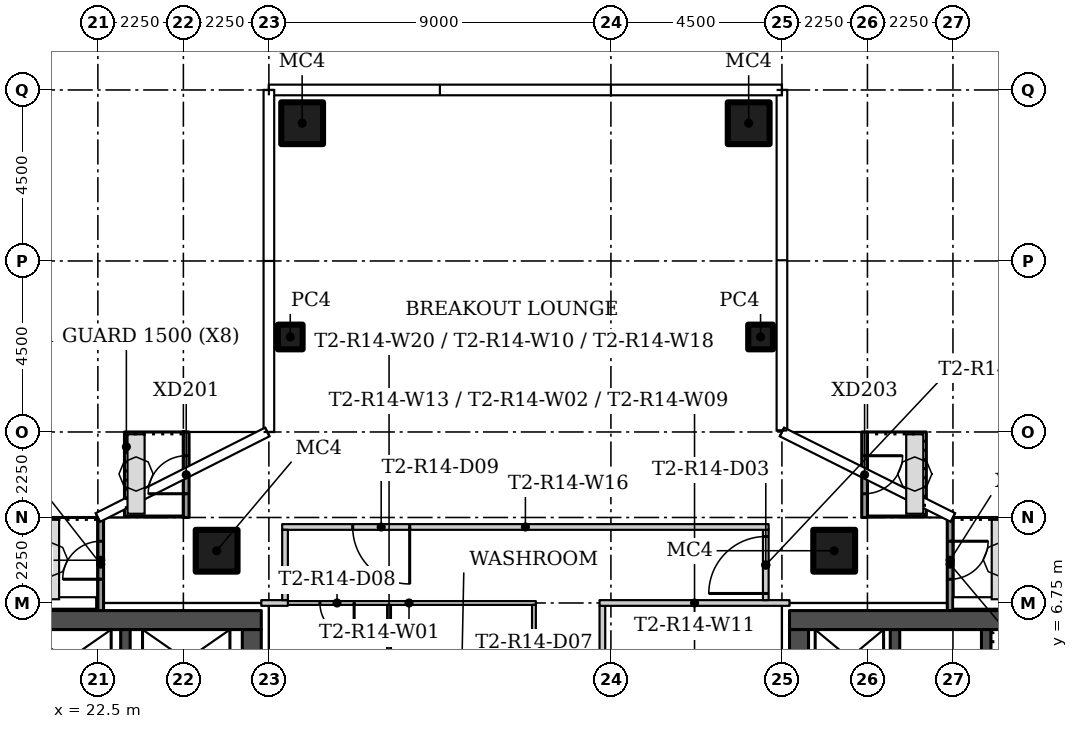
"""IFC4 building model, lengths in metres.
Left out: names, types, materials, properties, quantities, classifications, styles, units other than length and angle.
Written with IfcOpenShell. Run it as: python <this file> out.ifc"""

import sys

from ifc_helpers import new_model, si_unit, direction, frame, frame_2d, origin, origin_2d, place, context, subcontext, project, spatial, rectangle, hollow_rectangle, extrude, element, fill, save


model = new_model("IFC4")
c1 = context("Model", 3, precision=1e-05, world=origin(), true_north=direction((0.0, 1.0)))
c2 = subcontext(c1, "Body", "Model", "MODEL_VIEW")
j1 = project(units=[si_unit("LENGTHUNIT", "METRE"), si_unit("PLANEANGLEUNIT", "RADIAN")], contexts=[c1])
p1 = place(None, origin())
s1 = spatial("IfcSite", under=j1, at=p1, CompositionType="ELEMENT")
p2 = place(p1, origin())
s2 = spatial("IfcBuilding", under=s1, at=p2, CompositionType="ELEMENT")
p3 = place(p2, frame((0.0, 0.0, 138.9)))
s3 = spatial("IfcBuildingStorey", under=s2, at=p3, CompositionType="ELEMENT", Elevation=138.9)
for number, where in (
    (1, (25.625, 8.125, 0.0)),
    (2, (41.875, 8.125, 0.0)),
):
    element("IfcColumn", number, at=place(p3, frame(where)), inside=s3, PredefinedType="COLUMN", context=c2, shape_type="SweptSolid", body=[
        extrude(hollow_rectangle(XDim=1.1, YDim=1.1, WallThickness=0.04, at=origin_2d()), origin(), (0.0, 0.0, 1.0), 3.55),
    ])
p4 = place(p3, frame((39.938, 13.75, 0.0)))
e3 = element("IfcColumn", 3, at=p4, inside=s3, PredefinedType="COLUMN", context=c2, shape_type="SweptSolid", body=[
    extrude(hollow_rectangle(XDim=0.65, YDim=0.65, WallThickness=0.02, at=origin_2d()), origin(), (0.0, 0.0, 1.0), 3.55),
])
p5 = place(p3, frame((39.625, 19.375, 0.0)))
e4 = element("IfcColumn", 4, at=p5, inside=s3, PredefinedType="COLUMN", context=c2, shape_type="SweptSolid", body=[
    extrude(hollow_rectangle(XDim=1.1, YDim=1.1, WallThickness=0.04, at=origin_2d()), origin(), (0.0, 0.0, 1.0), 3.55),
])
p6 = place(p3, frame((27.562, 13.75, 0.0)))
e5 = element("IfcColumn", 5, at=p6, inside=s3, PredefinedType="COLUMN", context=c2, shape_type="SweptSolid", body=[
    extrude(hollow_rectangle(XDim=0.65, YDim=0.65, WallThickness=0.02, at=origin_2d()), origin(), (0.0, 0.0, 1.0), 3.55),
])
p7 = place(p3, frame((27.875, 19.375, 0.0)))
e6 = element("IfcColumn", 6, at=p7, inside=s3, PredefinedType="COLUMN", context=c2, shape_type="SweptSolid", body=[
    extrude(hollow_rectangle(XDim=1.1, YDim=1.1, WallThickness=0.04, at=origin_2d()), origin(), (0.0, 0.0, 1.0), 3.55),
])
p8 = place(p3, frame((34.025, 6.75, 0.0), z_axis=(0.0, 0.0, 1.0), x_axis=(-1.0, 0.0, 0.0)))
e7 = element("IfcWall", 7, at=p8, inside=s3, PredefinedType="PARTITIONING", context=c2, shape_type="SweptSolid", body=[
    extrude(rectangle(XDim=6.675, YDim=0.1, at=frame_2d((3.337, 0.0))), origin(), (0.0, 0.0, 1.0), 3.55),
])
p9 = place(p8, frame((4.781, 0.0, 0.0)))
e8 = element("IfcOpeningElement", 8, at=p9, cuts=e7, PredefinedType="OPENING", context=c2, shape_type="SweptSolid", body=[
    extrude(rectangle(XDim=0.9, YDim=2.1, at=frame_2d((0.45, 1.05))), frame((0.0, 0.06, 0.0), z_axis=(0.0, -1.0, 0.0), x_axis=(1.0, 0.0, 0.0)), (0.0, 0.0, 1.0), 0.12),
])
p10 = place(p3, frame((33.975, 2.5, 0.0), z_axis=(0.0, 0.0, 1.0), x_axis=(0.0, 1.0, 0.0)))
e9 = element("IfcWall", 9, at=p10, inside=s3, PredefinedType="PARTITIONING", context=c2, shape_type="SweptSolid", body=[
    extrude(rectangle(XDim=4.2, YDim=0.1, at=frame_2d((2.1, 0.0))), origin(), (0.0, 0.0, 1.0), 3.55),
])
p11 = place(p10, frame((1.65, 0.0, 0.0)))
e10 = element("IfcOpeningElement", 10, at=p11, cuts=e9, PredefinedType="OPENING", context=c2, shape_type="SweptSolid", body=[
    extrude(rectangle(XDim=0.9, YDim=2.1, at=frame_2d((0.45, 1.05))), frame((0.0, 0.06, 0.0), z_axis=(0.0, -1.0, 0.0), x_axis=(1.0, 0.0, 0.0)), (0.0, 0.0, 1.0), 0.12),
])
p12 = place(p3, frame((35.775, 6.675, 0.0), z_axis=(0.0, 0.0, 1.0), x_axis=(0.0, -1.0, 0.0)))
e11 = element("IfcWall", 11, at=p12, inside=s3, PredefinedType="PARTITIONING", context=c2, shape_type="SweptSolid", body=[
    extrude(rectangle(XDim=4.15, YDim=0.15, at=frame_2d((2.075, 0.0))), origin(), (0.0, 0.0, 1.0), 3.55),
])
p13 = place(p12, frame((1.625, 0.0, 0.0)))
e12 = element("IfcOpeningElement", 12, at=p13, cuts=e11, PredefinedType="OPENING", context=c2, shape_type="SweptSolid", body=[
    extrude(rectangle(XDim=0.9, YDim=2.1, at=frame_2d((0.45, 1.05))), frame((0.0, 0.085, 0.0), z_axis=(0.0, -1.0, 0.0), x_axis=(1.0, 0.0, 0.0)), (0.0, 0.0, 1.0), 0.17),
])
p14 = place(p3, frame((27.5, 6.75, 0.0), z_axis=(0.0, 0.0, 1.0), x_axis=(-1.0, 0.0, 0.0)))
e13 = element("IfcWall", 13, at=p14, inside=s3, PredefinedType="PARTITIONING", context=c2, shape_type="SweptSolid", body=[
    extrude(rectangle(XDim=0.7, YDim=0.15, at=frame_2d((0.35, 0.0))), origin(), (0.0, 0.0, 1.0), 3.55),
])
p15 = place(p3, frame((40.7, 6.75, 0.0), z_axis=(0.0, 0.0, 1.0), x_axis=(-1.0, 0.0, 0.0)))
e14 = element("IfcWall", 14, at=p15, inside=s3, PredefinedType="PARTITIONING", context=c2, shape_type="SweptSolid", body=[
    extrude(rectangle(XDim=5.0, YDim=0.15, at=frame_2d((2.5, 0.0))), origin(), (0.0, 0.0, 1.0), 3.55),
])
p16 = place(p3, frame((40.075, 6.825, 0.0), z_axis=(0.0, 0.0, 1.0), x_axis=(0.0, 1.0, 0.0)))
e15 = element("IfcWall", 15, at=p16, inside=s3, PredefinedType="PARTITIONING", context=c2, shape_type="SweptSolid", body=[
    extrude(rectangle(XDim=1.85, YDim=0.15, at=frame_2d((0.925, 0.0))), origin(), (0.0, 0.0, 1.0), 3.55),
])
p17 = place(p16, frame((0.175, 0.0, 0.0)))
e16 = element("IfcOpeningElement", 16, at=p17, cuts=e15, PredefinedType="OPENING", context=c2, shape_type="SweptSolid", body=[
    extrude(rectangle(XDim=1.5, YDim=2.1, at=frame_2d((0.75, 1.05))), frame((0.0, 0.085, 0.0), z_axis=(0.0, -1.0, 0.0), x_axis=(1.0, 0.0, 0.0)), (0.0, 0.0, 1.0), 0.17),
])
p18 = place(p3, frame((40.15, 8.75, 0.0), z_axis=(0.0, 0.0, 1.0), x_axis=(-1.0, 0.0, 0.0)))
e17 = element("IfcWall", 17, at=p18, inside=s3, PredefinedType="PARTITIONING", context=c2, shape_type="SweptSolid", body=[
    extrude(rectangle(XDim=12.8, YDim=0.15, at=frame_2d((6.4, 0.0))), origin(), (0.0, 0.0, 1.0), 3.55),
])
p19 = place(p18, frame((9.445, 0.0, 0.0)))
e18 = element("IfcOpeningElement", 18, at=p19, cuts=e17, PredefinedType="OPENING", context=c2, shape_type="SweptSolid", body=[
    extrude(rectangle(XDim=1.5, YDim=2.1, at=frame_2d((0.75, 1.05))), frame((0.0, 0.085, 0.0), z_axis=(0.0, -1.0, 0.0), x_axis=(1.0, 0.0, 0.0)), (0.0, 0.0, 1.0), 0.17),
])
p20 = place(p3, frame((27.425, 8.675, 0.0), z_axis=(0.0, 0.0, 1.0), x_axis=(0.0, -1.0, 0.0)))
e19 = element("IfcWall", 19, at=p20, inside=s3, PredefinedType="PARTITIONING", context=c2, shape_type="SweptSolid", body=[
    extrude(rectangle(XDim=1.85, YDim=0.15, at=frame_2d((0.925, 0.0))), origin(), (0.0, 0.0, 1.0), 3.55),
])
p21 = place(p3, frame((30.162, 6.7, 0.0), z_axis=(0.0, 0.0, 1.0), x_axis=(0.0, -1.0, 0.0)))
e20 = element("IfcWall", 20, at=p21, inside=s3, PredefinedType="PARTITIONING", context=c2, shape_type="SweptSolid", body=[
    extrude(rectangle(XDim=4.2, YDim=0.1, at=frame_2d((2.1, 0.0))), origin(), (0.0, 0.0, 1.0), 3.55),
])
p22 = place(p3, frame((24.825, 9.0, 0.0), z_axis=(0.0, 0.0, 1.0), x_axis=(0.0, 1.0, 0.0)))
e21 = element("IfcWall", 21, at=p22, inside=s3, PredefinedType="SOLIDWALL", context=c2, shape_type="SweptSolid", body=[
    extrude(rectangle(XDim=2.25, YDim=0.15, at=frame_2d((1.125, 0.0))), origin(), (0.0, 0.0, 1.0), 3.45),
])
p23 = place(p22, frame((0.625, 0.0, 0.0)))
e22 = element("IfcOpeningElement", 22, at=p23, cuts=e21, PredefinedType="OPENING", context=c2, shape_type="SweptSolid", body=[
    extrude(rectangle(XDim=1.0, YDim=2.4, at=frame_2d((0.5, 1.2))), frame((0.0, 0.085, 0.0), z_axis=(0.0, -1.0, 0.0), x_axis=(1.0, 0.0, 0.0)), (0.0, 0.0, 1.0), 0.17),
])
p24 = place(p3, frame((22.575, 6.543, 0.0), z_axis=(0.0, 0.0, 1.0), x_axis=(0.0, 1.0, 0.0)))
e23 = element("IfcWall", 23, at=p24, inside=s3, PredefinedType="SOLIDWALL", context=c2, shape_type="SweptSolid", body=[
    extrude(rectangle(XDim=2.457, YDim=0.15, at=frame_2d((1.229, 0.0))), origin(), (0.0, 0.0, 1.0), 3.45),
])
p25 = place(p24, frame((0.832, 0.0, 0.0)))
e24 = element("IfcOpeningElement", 24, at=p25, cuts=e23, PredefinedType="OPENING", context=c2, shape_type="SweptSolid", body=[
    extrude(rectangle(XDim=1.0, YDim=2.4, at=frame_2d((0.5, 1.2))), frame((0.0, 0.085, 0.0), z_axis=(0.0, -1.0, 0.0), x_axis=(1.0, 0.0, 0.0)), (0.0, 0.0, 1.0), 0.17),
])
p26 = place(p3, frame((42.675, 11.25, 0.0), z_axis=(0.0, 0.0, 1.0), x_axis=(0.0, -1.0, 0.0)))
e25 = element("IfcWall", 25, at=p26, inside=s3, PredefinedType="SOLIDWALL", context=c2, shape_type="SweptSolid", body=[
    extrude(rectangle(XDim=2.25, YDim=0.15, at=frame_2d((1.125, 0.0))), origin(), (0.0, 0.0, 1.0), 3.45),
])
p27 = place(p26, frame((0.625, 0.0, 0.0)))
e26 = element("IfcOpeningElement", 26, at=p27, cuts=e25, PredefinedType="OPENING", context=c2, shape_type="SweptSolid", body=[
    extrude(rectangle(XDim=1.0, YDim=2.4, at=frame_2d((0.5, 1.2))), frame((0.0, 0.085, 0.0), z_axis=(0.0, -1.0, 0.0), x_axis=(1.0, 0.0, 0.0)), (0.0, 0.0, 1.0), 0.17),
])
p28 = place(p3, frame((44.925, 9.0, 0.0), z_axis=(0.0, 0.0, 1.0), x_axis=(0.0, -1.0, 0.0)))
e27 = element("IfcWall", 27, at=p28, inside=s3, PredefinedType="SOLIDWALL", context=c2, shape_type="SweptSolid", body=[
    extrude(rectangle(XDim=2.457, YDim=0.15, at=frame_2d((1.229, 0.0))), origin(), (0.0, 0.0, 1.0), 3.45),
])
p29 = place(p28, frame((0.625, 0.0, 0.0)))
e28 = element("IfcOpeningElement", 28, at=p29, cuts=e27, PredefinedType="OPENING", context=c2, shape_type="SweptSolid", body=[
    extrude(rectangle(XDim=1.0, YDim=2.4, at=frame_2d((0.5, 1.2))), frame((0.0, 0.085, 0.0), z_axis=(0.0, -1.0, 0.0), x_axis=(1.0, 0.0, 0.0)), (0.0, 0.0, 1.0), 0.17),
])
p30 = place(p3, frame((13.7, 6.3, 0.0)))
e29 = element("IfcWall", 29, at=p30, inside=s3, PredefinedType="SHEAR", context=c2, shape_type="SweptSolid", body=[
    extrude(rectangle(XDim=13.1, YDim=0.5, at=frame_2d((6.55, 0.0))), origin(), (0.0, 0.0, 1.0), 3.55),
])
p31 = place(p3, frame((26.55, 6.05, 0.0), z_axis=(0.0, 0.0, 1.0), x_axis=(0.0, -1.0, 0.0)))
e30 = element("IfcWall", 30, at=p31, inside=s3, PredefinedType="SHEAR", context=c2, shape_type="SweptSolid", body=[
    extrude(rectangle(XDim=12.1, YDim=0.5, at=frame_2d((6.05, 0.0))), origin(), (0.0, 0.0, 1.0), 3.55),
])
p32 = place(p31, frame((10.1, 0.0, 0.0)))
e31 = element("IfcOpeningElement", 31, at=p32, cuts=e30, PredefinedType="OPENING", context=c2, shape_type="SweptSolid", body=[
    extrude(rectangle(XDim=1.2, YDim=2.1, at=frame_2d((0.6, 1.05))), frame((0.0, 0.26, 0.0), z_axis=(0.0, -1.0, 0.0), x_axis=(1.0, 0.0, 0.0)), (0.0, 0.0, 1.0), 0.52),
])
p33 = place(p31, frame((3.9, 0.0, 0.0)))
e32 = element("IfcOpeningElement", 32, at=p33, cuts=e30, PredefinedType="OPENING", context=c2, shape_type="SweptSolid", body=[
    extrude(rectangle(XDim=1.8, YDim=2.4, at=frame_2d((0.9, 1.2))), frame((0.0, 0.26, 0.0), z_axis=(0.0, -1.0, 0.0), x_axis=(1.0, 0.0, 0.0)), (0.0, 0.0, 1.0), 0.52),
])
p34 = place(p3, frame((23.225, 3.25, 0.0), z_axis=(0.0, 0.0, 1.0), x_axis=(0.0, 1.0, 0.0)))
e33 = element("IfcWall", 33, at=p34, inside=s3, PredefinedType="SHEAR", context=c2, shape_type="SweptSolid", body=[
    extrude(rectangle(XDim=2.8, YDim=0.25, at=frame_2d((1.4, 0.0))), origin(), (0.0, 0.0, 1.0), 3.55),
])
p35 = place(p3, frame((53.8, 6.3, 0.0), z_axis=(0.0, 0.0, 1.0), x_axis=(-1.0, 0.0, 0.0)))
e34 = element("IfcWall", 34, at=p35, inside=s3, PredefinedType="SHEAR", context=c2, shape_type="SweptSolid", body=[
    extrude(rectangle(XDim=13.1, YDim=0.5, at=frame_2d((6.55, 0.0))), origin(), (0.0, 0.0, 1.0), 3.55),
])
p36 = place(p3, frame((40.95, -6.05, 0.0), z_axis=(0.0, 0.0, 1.0), x_axis=(0.0, 1.0, 0.0)))
e35 = element("IfcWall", 35, at=p36, inside=s3, PredefinedType="SHEAR", context=c2, shape_type="SweptSolid", body=[
    extrude(rectangle(XDim=12.1, YDim=0.5, at=frame_2d((6.05, 0.0))), origin(), (0.0, 0.0, 1.0), 3.55),
])
p37 = place(p36, frame((0.8, 0.0, 0.0)))
e36 = element("IfcOpeningElement", 36, at=p37, cuts=e35, PredefinedType="OPENING", context=c2, shape_type="SweptSolid", body=[
    extrude(rectangle(XDim=1.2, YDim=2.1, at=frame_2d((0.6, 1.05))), frame((0.0, 0.26, 0.0), z_axis=(0.0, -1.0, 0.0), x_axis=(1.0, 0.0, 0.0)), (0.0, 0.0, 1.0), 0.52),
])
p38 = place(p36, frame((6.4, 0.0, 0.0)))
e37 = element("IfcOpeningElement", 37, at=p38, cuts=e35, PredefinedType="OPENING", context=c2, shape_type="SweptSolid", body=[
    extrude(rectangle(XDim=1.8, YDim=2.4, at=frame_2d((0.9, 1.2))), frame((0.0, 0.26, 0.0), z_axis=(0.0, -1.0, 0.0), x_axis=(1.0, 0.0, 0.0)), (0.0, 0.0, 1.0), 0.52),
])
for number, where, z_axis, x_axis in (
    (38, (45.875, 3.25, 0.0), (0.0, 0.0, 1.0), (0.0, 1.0, 0.0)),
    (39, (43.475, 3.25, 0.0), (0.0, 0.0, 1.0), (0.0, 1.0, 0.0)),
):
    element("IfcWall", number, at=place(p3, frame(where, z_axis=z_axis, x_axis=x_axis)), inside=s3, PredefinedType="SHEAR", context=c2, shape_type="SweptSolid", body=[
        extrude(rectangle(XDim=2.8, YDim=0.25, at=frame_2d((1.4, 0.0))), origin(), (0.0, 0.0, 1.0), 3.55),
    ])
p39 = place(p17, origin())
e40 = element("IfcDoor", 40, at=p39, inside=s3, OperationType="DOUBLE_DOOR_SINGLE_SWING", PredefinedType="DOOR", context=c2, shape_type="SweptSolid", body=[
    extrude(rectangle(XDim=1.5, YDim=2.1, at=frame_2d((0.75, 1.05))), frame((0.0, 0.025, 0.0), z_axis=(0.0, -1.0, 0.0), x_axis=(1.0, 0.0, 0.0)), (0.0, 0.0, 1.0), 0.05),
])
fill(e16, e40)
p40 = place(p9, origin())
e41 = element("IfcDoor", 41, at=p40, inside=s3, OperationType="SINGLE_SWING_RIGHT", PredefinedType="DOOR", context=c2, shape_type="SweptSolid", body=[
    extrude(rectangle(XDim=0.9, YDim=2.1, at=frame_2d((0.45, 1.05))), frame((0.0, 0.025, 0.0), z_axis=(0.0, -1.0, 0.0), x_axis=(1.0, 0.0, 0.0)), (0.0, 0.0, 1.0), 0.05),
])
fill(e8, e41)
p41 = place(p19, origin())
e42 = element("IfcDoor", 42, at=p41, inside=s3, OperationType="DOUBLE_DOOR_SINGLE_SWING", PredefinedType="DOOR", context=c2, shape_type="SweptSolid", body=[
    extrude(rectangle(XDim=1.5, YDim=2.1, at=frame_2d((0.75, 1.05))), frame((0.0, 0.025, 0.0), z_axis=(0.0, -1.0, 0.0), x_axis=(1.0, 0.0, 0.0)), (0.0, 0.0, 1.0), 0.05),
])
fill(e18, e42)
p42 = place(p23, origin())
e43 = element("IfcDoor", 43, at=p42, inside=s3, OperationType="SINGLE_SWING_RIGHT", PredefinedType="DOOR", context=c2, shape_type="SweptSolid", body=[
    extrude(rectangle(XDim=1.0, YDim=2.4, at=frame_2d((0.5, 1.2))), frame((0.0, 0.025, 0.0), z_axis=(0.0, -1.0, 0.0), x_axis=(1.0, 0.0, 0.0)), (0.0, 0.0, 1.0), 0.05),
])
fill(e22, e43)
p43 = place(p25, origin())
e44 = element("IfcDoor", 44, at=p43, inside=s3, OperationType="SINGLE_SWING_LEFT", PredefinedType="DOOR", context=c2, shape_type="SweptSolid", body=[
    extrude(rectangle(XDim=1.0, YDim=2.4, at=frame_2d((0.5, 1.2))), frame((0.0, 0.025, 0.0), z_axis=(0.0, -1.0, 0.0), x_axis=(1.0, 0.0, 0.0)), (0.0, 0.0, 1.0), 0.05),
])
fill(e24, e44)
p44 = place(p27, origin())
e45 = element("IfcDoor", 45, at=p44, inside=s3, OperationType="SINGLE_SWING_RIGHT", PredefinedType="DOOR", context=c2, shape_type="SweptSolid", body=[
    extrude(rectangle(XDim=1.0, YDim=2.4, at=frame_2d((0.5, 1.2))), frame((0.0, 0.025, 0.0), z_axis=(0.0, -1.0, 0.0), x_axis=(1.0, 0.0, 0.0)), (0.0, 0.0, 1.0), 0.05),
])
fill(e26, e45)
p45 = place(p29, origin())
e46 = element("IfcDoor", 46, at=p45, inside=s3, OperationType="SINGLE_SWING_LEFT", PredefinedType="DOOR", context=c2, shape_type="SweptSolid", body=[
    extrude(rectangle(XDim=1.0, YDim=2.4, at=frame_2d((0.5, 1.2))), frame((0.0, 0.025, 0.0), z_axis=(0.0, -1.0, 0.0), x_axis=(1.0, 0.0, 0.0)), (0.0, 0.0, 1.0), 0.05),
])
fill(e28, e46)
save(model, sys.argv[1])
